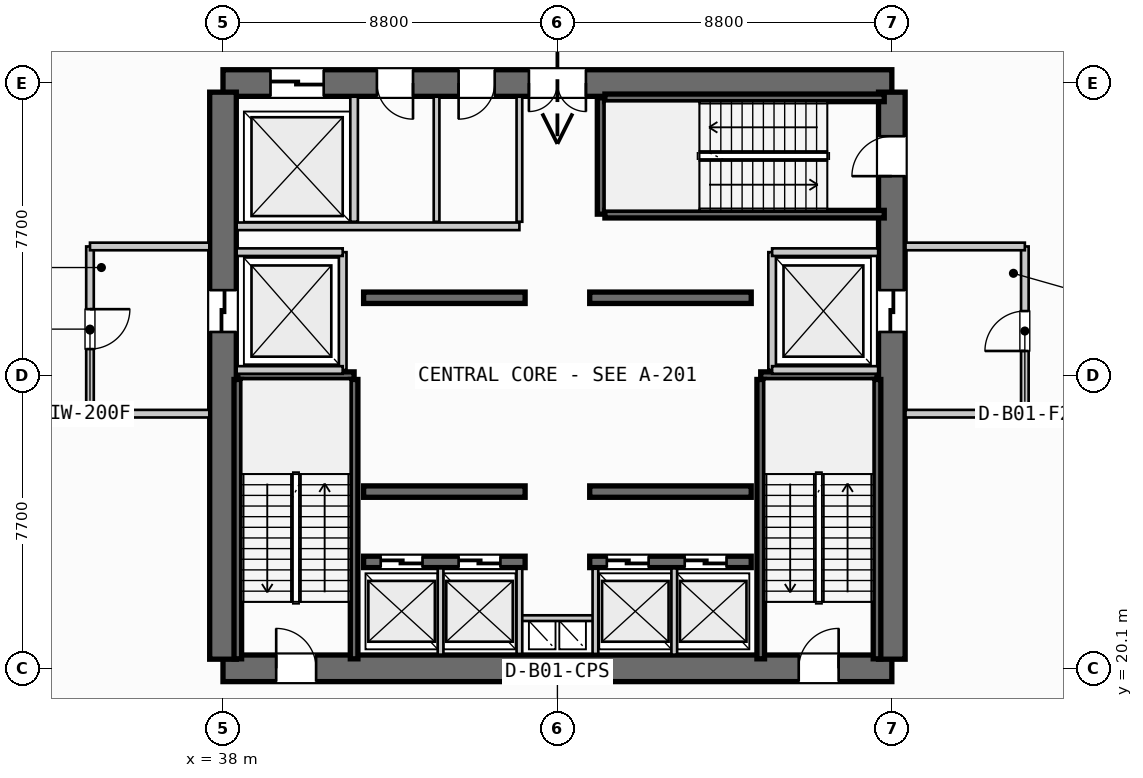
"""IFC4 building model, lengths in metres.
Left out: names, types, materials, properties, quantities, classifications, styles, units other than length and angle.
Written with IfcOpenShell. Run it as: python <this file> out.ifc"""

import sys

from ifc_helpers import new_model, si_unit, direction, frame, frame_2d, origin, place, context, subcontext, project, spatial, rectangle, extrude, source, transform, mapped, element, fill, save


model = new_model("IFC4")
c1 = context("Model", 3, precision=1e-05, world=origin(), true_north=direction((0.0, 1.0)))
c2 = subcontext(c1, "Body", "Model", "MODEL_VIEW")
j1 = project(units=[si_unit("LENGTHUNIT", "METRE"), si_unit("PLANEANGLEUNIT", "RADIAN")], contexts=[c1])
p1 = place(None, origin())
s1 = spatial("IfcSite", under=j1, at=p1, CompositionType="ELEMENT")
p2 = place(p1, origin())
s2 = spatial("IfcBuilding", under=s1, at=p2, CompositionType="ELEMENT")
p3 = place(p2, frame((0.0, 0.0, -4.5)))
s3 = spatial("IfcBuildingStorey", under=s2, at=p3, CompositionType="ELEMENT", Elevation=-4.5)
p4 = place(p3, frame((38.0, 20.1, 0.0), z_axis=(0.0, 0.0, 1.0), x_axis=(1.0, 0.0, 0.0)))
e1 = element("IfcWall", 1, at=p4, inside=s3, PredefinedType="SHEAR", context=c2, shape_type="SweptSolid", body=[
    extrude(rectangle(XDim=17.6, YDim=0.7, at=frame_2d((8.8, 0.0))), origin(), (0.0, 0.0, 1.0), 4.25),
])
p5 = place(p4, frame((1.4, 0.0, 0.0)))
e2 = element("IfcOpeningElement", 2, at=p5, cuts=e1, PredefinedType="OPENING", context=c2, shape_type="SweptSolid", body=[
    extrude(rectangle(XDim=1.05, YDim=2.15, at=frame_2d((0.525, 1.075))), frame((0.0, 0.36, 0.0), z_axis=(0.0, -1.0, 0.0), x_axis=(1.0, 0.0, 0.0)), (0.0, 0.0, 1.0), 0.72),
])
p6 = place(p4, frame((15.15, 0.0, 0.0)))
e3 = element("IfcOpeningElement", 3, at=p6, cuts=e1, PredefinedType="OPENING", context=c2, shape_type="SweptSolid", body=[
    extrude(rectangle(XDim=1.05, YDim=2.15, at=frame_2d((0.525, 1.075))), frame((0.0, 0.36, 0.0), z_axis=(0.0, -1.0, 0.0), x_axis=(1.0, 0.0, 0.0)), (0.0, 0.0, 1.0), 0.72),
])
p7 = place(p3, frame((55.6, 35.5, 0.0), z_axis=(0.0, 0.0, 1.0), x_axis=(-1.0, 0.0, 0.0)))
e4 = element("IfcWall", 4, at=p7, inside=s3, PredefinedType="SHEAR", context=c2, shape_type="SweptSolid", body=[
    extrude(rectangle(XDim=17.6, YDim=0.7, at=frame_2d((8.8, 0.0))), origin(), (0.0, 0.0, 1.0), 4.25),
])
p8 = place(p7, frame((8.05, 0.0, 0.0)))
e5 = element("IfcOpeningElement", 5, at=p8, cuts=e4, PredefinedType="OPENING", context=c2, shape_type="SweptSolid", body=[
    extrude(rectangle(XDim=1.5, YDim=2.2, at=frame_2d((0.75, 1.1))), frame((0.0, 0.36, 0.0), z_axis=(0.0, -1.0, 0.0), x_axis=(1.0, 0.0, 0.0)), (0.0, 0.0, 1.0), 0.72),
])
p9 = place(p7, frame((14.95, 0.0, 0.0)))
e6 = element("IfcOpeningElement", 6, at=p9, cuts=e4, PredefinedType="OPENING", context=c2, shape_type="SweptSolid", body=[
    extrude(rectangle(XDim=1.4, YDim=2.3, at=frame_2d((0.7, 1.15))), frame((0.0, 0.36, 0.0), z_axis=(0.0, -1.0, 0.0), x_axis=(1.0, 0.0, 0.0)), (0.0, 0.0, 1.0), 0.72),
])
p10 = place(p7, frame((12.6, 0.0, 0.0)))
e7 = element("IfcOpeningElement", 7, at=p10, cuts=e4, PredefinedType="OPENING", context=c2, shape_type="SweptSolid", body=[
    extrude(rectangle(XDim=0.95, YDim=2.15, at=frame_2d((0.475, 1.075))), frame((0.0, 0.36, 0.0), z_axis=(0.0, -1.0, 0.0), x_axis=(1.0, 0.0, 0.0)), (0.0, 0.0, 1.0), 0.72),
])
p11 = place(p7, frame((10.45, 0.0, 0.0)))
e8 = element("IfcOpeningElement", 8, at=p11, cuts=e4, PredefinedType="OPENING", context=c2, shape_type="SweptSolid", body=[
    extrude(rectangle(XDim=0.95, YDim=2.15, at=frame_2d((0.475, 1.075))), frame((0.0, 0.36, 0.0), z_axis=(0.0, -1.0, 0.0), x_axis=(1.0, 0.0, 0.0)), (0.0, 0.0, 1.0), 0.72),
])
p12 = place(p3, frame((38.0, 35.26, 0.0), z_axis=(0.0, 0.0, 1.0), x_axis=(0.0, -1.0, 0.0)))
e9 = element("IfcWall", 9, at=p12, inside=s3, PredefinedType="SHEAR", context=c2, shape_type="SweptSolid", body=[
    extrude(rectangle(XDim=14.92, YDim=0.7, at=frame_2d((7.46, 0.0))), origin(), (0.0, 0.0, 1.0), 4.25),
])
p13 = place(p12, frame((5.21, 0.0, 0.0)))
e10 = element("IfcOpeningElement", 10, at=p13, cuts=e9, PredefinedType="OPENING", context=c2, shape_type="SweptSolid", body=[
    extrude(rectangle(XDim=1.1, YDim=2.2, at=frame_2d((0.55, 1.1))), frame((0.0, 0.36, 0.0), z_axis=(0.0, -1.0, 0.0), x_axis=(1.0, 0.0, 0.0)), (0.0, 0.0, 1.0), 0.72),
])
p14 = place(p3, frame((55.6, 20.34, 0.0), z_axis=(0.0, 0.0, 1.0), x_axis=(0.0, 1.0, 0.0)))
e11 = element("IfcWall", 11, at=p14, inside=s3, PredefinedType="SHEAR", context=c2, shape_type="SweptSolid", body=[
    extrude(rectangle(XDim=14.92, YDim=0.7, at=frame_2d((7.46, 0.0))), origin(), (0.0, 0.0, 1.0), 4.25),
])
p15 = place(p14, frame((12.71, 0.0, 0.0)))
e12 = element("IfcOpeningElement", 12, at=p15, cuts=e11, PredefinedType="OPENING", context=c2, shape_type="SweptSolid", body=[
    extrude(rectangle(XDim=1.05, YDim=2.15, at=frame_2d((0.525, 1.075))), frame((0.0, 0.36, 0.0), z_axis=(0.0, -1.0, 0.0), x_axis=(1.0, 0.0, 0.0)), (0.0, 0.0, 1.0), 0.72),
])
p16 = place(p14, frame((8.61, 0.0, 0.0)))
e13 = element("IfcOpeningElement", 13, at=p16, cuts=e11, PredefinedType="OPENING", context=c2, shape_type="SweptSolid", body=[
    extrude(rectangle(XDim=1.1, YDim=2.2, at=frame_2d((0.55, 1.1))), frame((0.0, 0.36, 0.0), z_axis=(0.0, -1.0, 0.0), x_axis=(1.0, 0.0, 0.0)), (0.0, 0.0, 1.0), 0.72),
])
p17 = place(p3, frame((41.7, 22.9, 0.0), z_axis=(0.0, 0.0, 1.0), x_axis=(1.0, 0.0, 0.0)))
e14 = element("IfcWall", 14, at=p17, inside=s3, PredefinedType="SHEAR", context=c2, shape_type="SweptSolid", body=[
    extrude(rectangle(XDim=4.25, YDim=0.3, at=frame_2d((2.125, 0.0))), origin(), (0.0, 0.0, 1.0), 4.25),
])
p18 = place(p17, frame((0.45, 0.0, 0.0)))
e15 = element("IfcOpeningElement", 15, at=p18, cuts=e14, PredefinedType="OPENING", context=c2, shape_type="SweptSolid", body=[
    extrude(rectangle(XDim=1.1, YDim=2.2, at=frame_2d((0.55, 1.1))), frame((0.0, 0.16, 0.0), z_axis=(0.0, -1.0, 0.0), x_axis=(1.0, 0.0, 0.0)), (0.0, 0.0, 1.0), 0.32),
])
p19 = place(p17, frame((2.5, 0.0, 0.0)))
e16 = element("IfcOpeningElement", 16, at=p19, cuts=e14, PredefinedType="OPENING", context=c2, shape_type="SweptSolid", body=[
    extrude(rectangle(XDim=1.1, YDim=2.2, at=frame_2d((0.55, 1.1))), frame((0.0, 0.16, 0.0), z_axis=(0.0, -1.0, 0.0), x_axis=(1.0, 0.0, 0.0)), (0.0, 0.0, 1.0), 0.32),
])
p20 = place(p3, frame((47.65, 22.9, 0.0), z_axis=(0.0, 0.0, 1.0), x_axis=(1.0, 0.0, 0.0)))
e17 = element("IfcWall", 17, at=p20, inside=s3, PredefinedType="SHEAR", context=c2, shape_type="SweptSolid", body=[
    extrude(rectangle(XDim=4.25, YDim=0.3, at=frame_2d((2.125, 0.0))), origin(), (0.0, 0.0, 1.0), 4.25),
])
p21 = place(p20, frame((0.45, 0.0, 0.0)))
e18 = element("IfcOpeningElement", 18, at=p21, cuts=e17, PredefinedType="OPENING", context=c2, shape_type="SweptSolid", body=[
    extrude(rectangle(XDim=1.1, YDim=2.2, at=frame_2d((0.55, 1.1))), frame((0.0, 0.16, 0.0), z_axis=(0.0, -1.0, 0.0), x_axis=(1.0, 0.0, 0.0)), (0.0, 0.0, 1.0), 0.32),
])
p22 = place(p20, frame((2.5, 0.0, 0.0)))
e19 = element("IfcOpeningElement", 19, at=p22, cuts=e17, PredefinedType="OPENING", context=c2, shape_type="SweptSolid", body=[
    extrude(rectangle(XDim=1.1, YDim=2.2, at=frame_2d((0.55, 1.1))), frame((0.0, 0.16, 0.0), z_axis=(0.0, -1.0, 0.0), x_axis=(1.0, 0.0, 0.0)), (0.0, 0.0, 1.0), 0.32),
])
for number, where, z_axis, x_axis in (
    (20, (41.7, 24.75, 0.0), (0.0, 0.0, 1.0), (1.0, 0.0, 0.0)),
    (21, (47.65, 24.75, 0.0), (0.0, 0.0, 1.0), (1.0, 0.0, 0.0)),
    (22, (41.7, 29.85, 0.0), (0.0, 0.0, 1.0), (1.0, 0.0, 0.0)),
    (23, (47.65, 29.85, 0.0), (0.0, 0.0, 1.0), (1.0, 0.0, 0.0)),
):
    element("IfcWall", number, at=place(p3, frame(where, z_axis=z_axis, x_axis=x_axis)), inside=s3, PredefinedType="SHEAR", context=c2, shape_type="SweptSolid", body=[
        extrude(rectangle(XDim=4.25, YDim=0.3, at=frame_2d((2.125, 0.0))), origin(), (0.0, 0.0, 1.0), 4.25),
    ])
p23 = place(p3, frame((38.39, 27.8, 0.0), z_axis=(0.0, 0.0, 1.0), x_axis=(1.0, 0.0, 0.0)))
e24 = element("IfcWall", 24, at=p23, inside=s3, PredefinedType="SHEAR", context=c2, shape_type="SweptSolid", body=[
    extrude(rectangle(XDim=3.06, YDim=0.2, at=frame_2d((1.53, 0.0))), origin(), (0.0, 0.0, 1.0), 4.25),
])
for number, where, z_axis, x_axis in (
    (25, (41.45, 27.7, 0.0), (0.0, 0.0, 1.0), (0.0, -1.0, 0.0)),
    (26, (38.39, 20.35, 0.0), (0.0, 0.0, 1.0), (0.0, 1.0, 0.0)),
):
    element("IfcWall", number, at=place(p3, frame(where, z_axis=z_axis, x_axis=x_axis)), inside=s3, PredefinedType="SHEAR", context=c2, shape_type="SweptSolid", body=[
        extrude(rectangle(XDim=7.35, YDim=0.2, at=frame_2d((3.675, 0.0))), origin(), (0.0, 0.0, 1.0), 4.25),
    ])
p24 = place(p3, frame((52.15, 27.8, 0.0), z_axis=(0.0, 0.0, 1.0), x_axis=(1.0, 0.0, 0.0)))
e27 = element("IfcWall", 27, at=p24, inside=s3, PredefinedType="SHEAR", context=c2, shape_type="SweptSolid", body=[
    extrude(rectangle(XDim=3.06, YDim=0.2, at=frame_2d((1.53, 0.0))), origin(), (0.0, 0.0, 1.0), 4.25),
])
for number, where, z_axis, x_axis in (
    (28, (55.21, 27.7, 0.0), (0.0, 0.0, 1.0), (0.0, -1.0, 0.0)),
    (29, (52.15, 20.35, 0.0), (0.0, 0.0, 1.0), (0.0, 1.0, 0.0)),
):
    element("IfcWall", number, at=place(p3, frame(where, z_axis=z_axis, x_axis=x_axis)), inside=s3, PredefinedType="SHEAR", context=c2, shape_type="SweptSolid", body=[
        extrude(rectangle(XDim=7.35, YDim=0.2, at=frame_2d((3.675, 0.0))), origin(), (0.0, 0.0, 1.0), 4.25),
    ])
p25 = place(p3, frame((47.95, 32.05, 0.0), z_axis=(0.0, 0.0, 1.0), x_axis=(0.0, 1.0, 0.0)))
e30 = element("IfcWall", 30, at=p25, inside=s3, PredefinedType="SHEAR", context=c2, shape_type="SweptSolid", body=[
    extrude(rectangle(XDim=3.06, YDim=0.2, at=frame_2d((1.53, 0.0))), origin(), (0.0, 0.0, 1.0), 4.25),
])
for number, where, z_axis, x_axis in (
    (31, (48.05, 35.11, 0.0), (0.0, 0.0, 1.0), (1.0, 0.0, 0.0)),
    (32, (55.4, 32.05, 0.0), (0.0, 0.0, 1.0), (-1.0, 0.0, 0.0)),
):
    element("IfcWall", number, at=place(p3, frame(where, z_axis=z_axis, x_axis=x_axis)), inside=s3, PredefinedType="SHEAR", context=c2, shape_type="SweptSolid", body=[
        extrude(rectangle(XDim=7.35, YDim=0.2, at=frame_2d((3.675, 0.0))), origin(), (0.0, 0.0, 1.0), 4.25),
    ])
p26 = place(p3, frame((45.8, 21.42, 0.0), z_axis=(0.0, 0.0, 1.0), x_axis=(1.0, 0.0, 0.0)))
e33 = element("IfcWall", 33, at=p26, inside=s3, PredefinedType="PARTITIONING", context=c2, shape_type="SweptSolid", body=[
    extrude(rectangle(XDim=2.0, YDim=0.15, at=frame_2d((1.0, 0.0))), origin(), (0.0, 0.0, 1.0), 3.463),
])
for number, where, z_axis, x_axis in (
    (34, (45.8, 20.48, 0.0), (0.0, 0.0, 1.0), (0.0, 1.0, 0.0)),
    (35, (47.8, 20.48, 0.0), (0.0, 0.0, 1.0), (0.0, 1.0, 0.0)),
):
    element("IfcWall", number, at=place(p3, frame(where, z_axis=z_axis, x_axis=x_axis)), inside=s3, PredefinedType="PARTITIONING", context=c2, shape_type="SweptSolid", body=[
        extrude(rectangle(XDim=2.24, YDim=0.15, at=frame_2d((1.12, 0.0))), origin(), (0.0, 0.0, 1.0), 3.463),
    ])
p27 = place(p3, frame((41.15, 27.95, 0.0), z_axis=(0.0, 0.0, 1.0), x_axis=(0.0, 1.0, 0.0)))
e36 = element("IfcWall", 36, at=p27, inside=s3, PredefinedType="PARTITIONING", context=c2, shape_type="SweptSolid", body=[
    extrude(rectangle(XDim=3.1, YDim=0.2, at=frame_2d((1.55, 0.0))), origin(), (0.0, 0.0, 1.0), 3.463),
])
for number, where, z_axis, x_axis in (
    (37, (38.36, 27.95, 0.0), (0.0, 0.0, 1.0), (1.0, 0.0, 0.0)),
    (38, (38.36, 31.05, 0.0), (0.0, 0.0, 1.0), (1.0, 0.0, 0.0)),
):
    element("IfcWall", number, at=place(p3, frame(where, z_axis=z_axis, x_axis=x_axis)), inside=s3, PredefinedType="PARTITIONING", context=c2, shape_type="SweptSolid", body=[
        extrude(rectangle(XDim=2.79, YDim=0.2, at=frame_2d((1.395, 0.0))), origin(), (0.0, 0.0, 1.0), 3.463),
    ])
p28 = place(p3, frame((34.5, 31.2, 0.0), z_axis=(0.0, 0.0, 1.0), x_axis=(0.0, -1.0, 0.0)))
e39 = element("IfcWall", 39, at=p28, inside=s3, PredefinedType="PARTITIONING", context=c2, shape_type="SweptSolid", body=[
    extrude(rectangle(XDim=4.4, YDim=0.2, at=frame_2d((2.2, 0.0))), origin(), (0.0, 0.0, 1.0), 3.463),
])
p29 = place(p28, frame((1.65, 0.0, 0.0)))
e40 = element("IfcOpeningElement", 40, at=p29, cuts=e39, PredefinedType="OPENING", context=c2, shape_type="SweptSolid", body=[
    extrude(rectangle(XDim=1.05, YDim=2.15, at=frame_2d((0.525, 1.075))), frame((0.0, 0.11, 0.0), z_axis=(0.0, -1.0, 0.0), x_axis=(1.0, 0.0, 0.0)), (0.0, 0.0, 1.0), 0.22),
])
for number, where, z_axis, x_axis in (
    (41, (34.5, 26.8, 0.0), (0.0, 0.0, 1.0), (1.0, 0.0, 0.0)),
    (42, (34.5, 31.2, 0.0), (0.0, 0.0, 1.0), (1.0, 0.0, 0.0)),
):
    element("IfcWall", number, at=place(p3, frame(where, z_axis=z_axis, x_axis=x_axis)), inside=s3, PredefinedType="PARTITIONING", context=c2, shape_type="SweptSolid", body=[
        extrude(rectangle(XDim=3.14, YDim=0.2, at=frame_2d((1.57, 0.0))), origin(), (0.0, 0.0, 1.0), 3.463),
    ])
p30 = place(p3, frame((52.45, 27.95, 0.0), z_axis=(0.0, 0.0, 1.0), x_axis=(0.0, 1.0, 0.0)))
e43 = element("IfcWall", 43, at=p30, inside=s3, PredefinedType="PARTITIONING", context=c2, shape_type="SweptSolid", body=[
    extrude(rectangle(XDim=3.1, YDim=0.2, at=frame_2d((1.55, 0.0))), origin(), (0.0, 0.0, 1.0), 3.463),
])
for number, where, z_axis, x_axis in (
    (44, (52.45, 27.95, 0.0), (0.0, 0.0, 1.0), (1.0, 0.0, 0.0)),
    (45, (52.45, 31.05, 0.0), (0.0, 0.0, 1.0), (1.0, 0.0, 0.0)),
):
    element("IfcWall", number, at=place(p3, frame(where, z_axis=z_axis, x_axis=x_axis)), inside=s3, PredefinedType="PARTITIONING", context=c2, shape_type="SweptSolid", body=[
        extrude(rectangle(XDim=2.79, YDim=0.2, at=frame_2d((1.395, 0.0))), origin(), (0.0, 0.0, 1.0), 3.463),
    ])
p31 = place(p3, frame((59.1, 26.8, 0.0), z_axis=(0.0, 0.0, 1.0), x_axis=(0.0, 1.0, 0.0)))
e46 = element("IfcWall", 46, at=p31, inside=s3, PredefinedType="PARTITIONING", context=c2, shape_type="SweptSolid", body=[
    extrude(rectangle(XDim=4.4, YDim=0.2, at=frame_2d((2.2, 0.0))), origin(), (0.0, 0.0, 1.0), 3.463),
])
p32 = place(p31, frame((1.65, 0.0, 0.0)))
e47 = element("IfcOpeningElement", 47, at=p32, cuts=e46, PredefinedType="OPENING", context=c2, shape_type="SweptSolid", body=[
    extrude(rectangle(XDim=1.05, YDim=2.15, at=frame_2d((0.525, 1.075))), frame((0.0, 0.11, 0.0), z_axis=(0.0, -1.0, 0.0), x_axis=(1.0, 0.0, 0.0)), (0.0, 0.0, 1.0), 0.22),
])
for number, where, z_axis, x_axis in (
    (48, (55.96, 26.8, 0.0), (0.0, 0.0, 1.0), (1.0, 0.0, 0.0)),
    (49, (55.96, 31.2, 0.0), (0.0, 0.0, 1.0), (1.0, 0.0, 0.0)),
):
    element("IfcWall", number, at=place(p3, frame(where, z_axis=z_axis, x_axis=x_axis)), inside=s3, PredefinedType="PARTITIONING", context=c2, shape_type="SweptSolid", body=[
        extrude(rectangle(XDim=3.14, YDim=0.2, at=frame_2d((1.57, 0.0))), origin(), (0.0, 0.0, 1.0), 3.463),
    ])
for number, where, z_axis, x_axis in (
    (50, (43.725, 20.46, 0.0), (0.0, 0.0, 1.0), (0.0, 1.0, 0.0)),
    (51, (49.875, 20.46, 0.0), (0.0, 0.0, 1.0), (0.0, 1.0, 0.0)),
):
    element("IfcWall", number, at=place(p3, frame(where, z_axis=z_axis, x_axis=x_axis)), inside=s3, PredefinedType="PARTITIONING", context=c2, shape_type="SweptSolid", body=[
        extrude(rectangle(XDim=2.27, YDim=0.15, at=frame_2d((1.135, 0.0))), origin(), (0.0, 0.0, 1.0), 3.463),
    ])
p33 = place(p3, frame((41.45, 31.85, 0.0), z_axis=(0.0, 0.0, 1.0), x_axis=(0.0, 1.0, 0.0)))
e52 = element("IfcWall", 52, at=p33, inside=s3, PredefinedType="PARTITIONING", context=c2, shape_type="SweptSolid", body=[
    extrude(rectangle(XDim=3.29, YDim=0.2, at=frame_2d((1.645, 0.0))), origin(), (0.0, 0.0, 1.0), 3.463),
])
p34 = place(p3, frame((38.36, 31.73, 0.0), z_axis=(0.0, 0.0, 1.0), x_axis=(1.0, 0.0, 0.0)))
e53 = element("IfcWall", 53, at=p34, inside=s3, PredefinedType="PARTITIONING", context=c2, shape_type="SweptSolid", body=[
    extrude(rectangle(XDim=7.44, YDim=0.2, at=frame_2d((3.72, 0.0))), origin(), (0.0, 0.0, 1.0), 3.463),
])
p35 = place(p3, frame((45.8, 31.85, 0.0), z_axis=(0.0, 0.0, 1.0), x_axis=(0.0, 1.0, 0.0)))
e54 = element("IfcWall", 54, at=p35, inside=s3, PredefinedType="PARTITIONING", context=c2, shape_type="SweptSolid", body=[
    extrude(rectangle(XDim=3.29, YDim=0.15, at=frame_2d((1.645, 0.0))), origin(), (0.0, 0.0, 1.0), 3.463),
])
p36 = place(p3, frame((43.62, 31.85, 0.0), z_axis=(0.0, 0.0, 1.0), x_axis=(0.0, 1.0, 0.0)))
e55 = element("IfcWall", 55, at=p36, inside=s3, PredefinedType="PLUMBINGWALL", context=c2, shape_type="SweptSolid", body=[
    extrude(rectangle(XDim=3.29, YDim=0.15, at=frame_2d((1.645, 0.0))), origin(), (0.0, 0.0, 1.0), 3.463),
])
m1 = source(origin(), c2, "Body", "SweptSolid", [
    extrude(rectangle(XDim=1.05, YDim=2.15, at=frame_2d((0.525, 1.075))), frame((0.0, 0.025, 0.0), z_axis=(0.0, -1.0, 0.0), x_axis=(1.0, 0.0, 0.0)), (0.0, 0.0, 1.0), 0.05),
])
p37 = place(p5, origin())
e56 = element("IfcDoor", 56, at=p37, inside=s3, OperationType="SINGLE_SWING_LEFT", PredefinedType="DOOR", context=c2, shape_type="MappedRepresentation", body=[
    mapped(m1, transform((0.0, 0.0, 0.0), scale=1.0)),
])
fill(e2, e56)
p38 = place(p6, origin())
e57 = element("IfcDoor", 57, at=p38, inside=s3, OperationType="SINGLE_SWING_RIGHT", PredefinedType="DOOR", context=c2, shape_type="MappedRepresentation", body=[
    mapped(m1, transform((0.0, 0.0, 0.0), scale=1.0)),
])
fill(e3, e57)
p39 = place(p15, origin())
e58 = element("IfcDoor", 58, at=p39, inside=s3, OperationType="SINGLE_SWING_LEFT", PredefinedType="DOOR", context=c2, shape_type="MappedRepresentation", body=[
    mapped(m1, transform((0.0, 0.0, 0.0), scale=1.0)),
])
fill(e12, e58)
m2 = source(origin(), c2, "Body", "SweptSolid", [
    extrude(rectangle(XDim=1.5, YDim=2.2, at=frame_2d((0.75, 1.1))), frame((0.0, 0.025, 0.0), z_axis=(0.0, -1.0, 0.0), x_axis=(1.0, 0.0, 0.0)), (0.0, 0.0, 1.0), 0.05),
])
p40 = place(p8, origin())
e59 = element("IfcDoor", 59, at=p40, inside=s3, OperationType="DOUBLE_DOOR_SINGLE_SWING", PredefinedType="DOOR", context=c2, shape_type="MappedRepresentation", body=[
    mapped(m2, transform((0.0, 0.0, 0.0), scale=1.0)),
])
fill(e5, e59)
m3 = source(origin(), c2, "Body", "SweptSolid", [
    extrude(rectangle(XDim=1.1, YDim=2.2, at=frame_2d((0.55, 1.1))), frame((0.0, 0.025, 0.0), z_axis=(0.0, -1.0, 0.0), x_axis=(1.0, 0.0, 0.0)), (0.0, 0.0, 1.0), 0.05),
])
p41 = place(p13, origin())
e60 = element("IfcDoor", 60, at=p41, inside=s3, OperationType="SLIDING_TO_LEFT", PredefinedType="DOOR", context=c2, shape_type="MappedRepresentation", body=[
    mapped(m3, transform((0.0, 0.0, 0.0), scale=1.0)),
])
fill(e10, e60)
p42 = place(p16, origin())
e61 = element("IfcDoor", 61, at=p42, inside=s3, OperationType="SLIDING_TO_RIGHT", PredefinedType="DOOR", context=c2, shape_type="MappedRepresentation", body=[
    mapped(m3, transform((0.0, 0.0, 0.0), scale=1.0)),
])
fill(e13, e61)
p43 = place(p18, origin())
e62 = element("IfcDoor", 62, at=p43, inside=s3, OperationType="SLIDING_TO_LEFT", PredefinedType="DOOR", context=c2, shape_type="MappedRepresentation", body=[
    mapped(m3, transform((0.0, 0.0, 0.0), scale=1.0)),
])
fill(e15, e62)
p44 = place(p19, origin())
e63 = element("IfcDoor", 63, at=p44, inside=s3, OperationType="SLIDING_TO_LEFT", PredefinedType="DOOR", context=c2, shape_type="MappedRepresentation", body=[
    mapped(m3, transform((0.0, 0.0, 0.0), scale=1.0)),
])
fill(e16, e63)
p45 = place(p21, origin())
e64 = element("IfcDoor", 64, at=p45, inside=s3, OperationType="SLIDING_TO_LEFT", PredefinedType="DOOR", context=c2, shape_type="MappedRepresentation", body=[
    mapped(m3, transform((0.0, 0.0, 0.0), scale=1.0)),
])
fill(e18, e64)
p46 = place(p22, origin())
e65 = element("IfcDoor", 65, at=p46, inside=s3, OperationType="SLIDING_TO_LEFT", PredefinedType="DOOR", context=c2, shape_type="MappedRepresentation", body=[
    mapped(m3, transform((0.0, 0.0, 0.0), scale=1.0)),
])
fill(e19, e65)
m4 = source(origin(), c2, "Body", "SweptSolid", [
    extrude(rectangle(XDim=1.4, YDim=2.3, at=frame_2d((0.7, 1.15))), frame((0.0, 0.025, 0.0), z_axis=(0.0, -1.0, 0.0), x_axis=(1.0, 0.0, 0.0)), (0.0, 0.0, 1.0), 0.05),
])
p47 = place(p9, origin())
e66 = element("IfcDoor", 66, at=p47, inside=s3, OperationType="SLIDING_TO_RIGHT", PredefinedType="DOOR", context=c2, shape_type="MappedRepresentation", body=[
    mapped(m4, transform((0.0, 0.0, 0.0), scale=1.0)),
])
fill(e6, e66)
m5 = source(origin(), c2, "Body", "SweptSolid", [
    extrude(rectangle(XDim=0.95, YDim=2.15, at=frame_2d((0.475, 1.075))), frame((0.0, 0.025, 0.0), z_axis=(0.0, -1.0, 0.0), x_axis=(1.0, 0.0, 0.0)), (0.0, 0.0, 1.0), 0.05),
])
p48 = place(p10, origin())
e67 = element("IfcDoor", 67, at=p48, inside=s3, OperationType="SINGLE_SWING_LEFT", PredefinedType="DOOR", context=c2, shape_type="MappedRepresentation", body=[
    mapped(m5, transform((0.0, 0.0, 0.0), scale=1.0)),
])
fill(e7, e67)
p49 = place(p11, origin())
e68 = element("IfcDoor", 68, at=p49, inside=s3, OperationType="SINGLE_SWING_RIGHT", PredefinedType="DOOR", context=c2, shape_type="MappedRepresentation", body=[
    mapped(m5, transform((0.0, 0.0, 0.0), scale=1.0)),
])
fill(e8, e68)
p50 = place(p29, origin())
e69 = element("IfcDoor", 69, at=p50, inside=s3, OperationType="SINGLE_SWING_LEFT", PredefinedType="DOOR", context=c2, shape_type="MappedRepresentation", body=[
    mapped(m1, transform((0.0, 0.0, 0.0), scale=1.0)),
])
fill(e40, e69)
p51 = place(p32, origin())
e70 = element("IfcDoor", 70, at=p51, inside=s3, OperationType="SINGLE_SWING_LEFT", PredefinedType="DOOR", context=c2, shape_type="MappedRepresentation", body=[
    mapped(m1, transform((0.0, 0.0, 0.0), scale=1.0)),
])
fill(e47, e70)
save(model, sys.argv[1])
